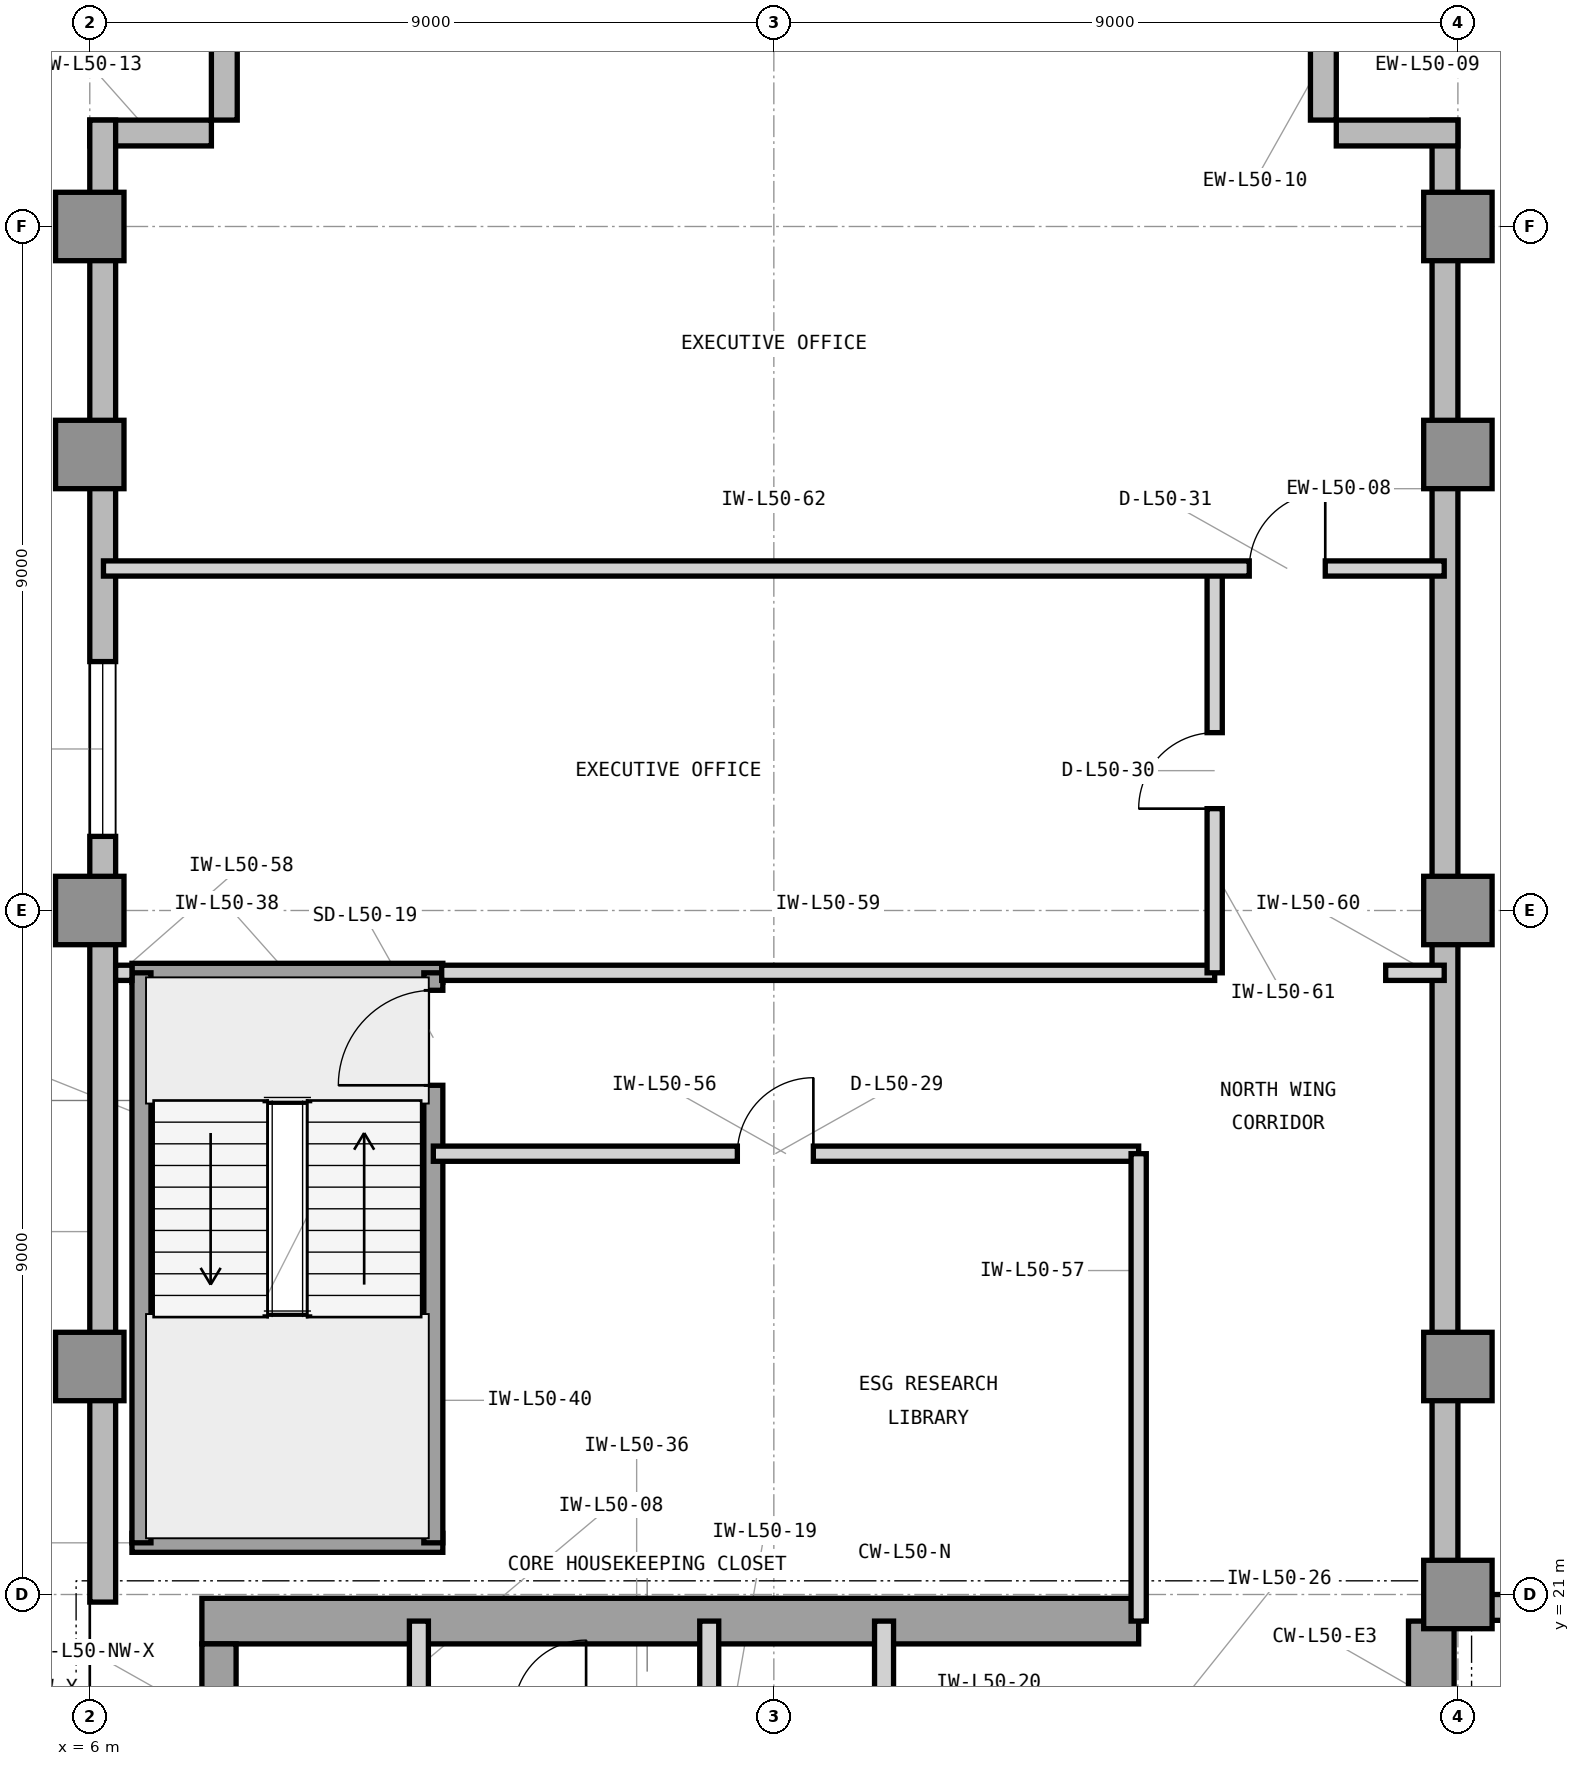
"""IFC4 building model, lengths in metres.
Left out: names, types, materials, properties, quantities, classifications, styles, units other than length and angle.
Written with IfcOpenShell. Run it as: python <this file> out.ifc"""

import sys

from ifc_helpers import new_model, si_unit, direction, frame, frame_2d, origin, origin_2d, place, context, subcontext, project, spatial, rectangle, extrude, element, fill, save


model = new_model("IFC4")
c1 = context("Model", 3, precision=1e-05, world=origin(), true_north=direction((0.0, 1.0)))
c2 = subcontext(c1, "Body", "Model", "MODEL_VIEW")
j1 = project(units=[si_unit("LENGTHUNIT", "METRE"), si_unit("PLANEANGLEUNIT", "RADIAN")], contexts=[c1])
p1 = place(None, origin())
s1 = spatial("IfcSite", under=j1, at=p1, CompositionType="ELEMENT")
p2 = place(p1, origin())
s2 = spatial("IfcBuilding", under=s1, at=p2, CompositionType="ELEMENT")
p3 = place(p2, frame((0.0, 0.0, 207.3)))
s3 = spatial("IfcBuildingStorey", under=s2, at=p3, CompositionType="ELEMENT", Elevation=207.3)
p4 = place(p3, frame((7.475, 20.65, 0.0), z_axis=(0.0, 0.0, 1.0), x_axis=(1.0, 0.0, 0.0)))
e1 = element("IfcWall", 1, at=p4, inside=s3, PredefinedType="SHEAR", context=c2, shape_type="SweptSolid", body=[
    extrude(rectangle(XDim=12.325, YDim=0.6, at=frame_2d((6.163, 0.0))), origin(), (0.0, 0.0, 1.0), 3.9),
])
p5 = place(p3, frame((23.65, 16.6, 0.0), z_axis=(0.0, 0.0, 1.0), x_axis=(0.0, 1.0, 0.0)))
e2 = element("IfcWall", 2, at=p5, inside=s3, PredefinedType="SHEAR", context=c2, shape_type="SweptSolid", body=[
    extrude(rectangle(XDim=4.05, YDim=0.6, at=frame_2d((2.025, 0.0))), origin(), (0.0, 0.0, 1.0), 3.9),
])
p6 = place(p3, frame((7.7, 19.575, 0.0), z_axis=(0.0, 0.0, 1.0), x_axis=(0.0, 1.0, 0.0)))
e3 = element("IfcWall", 3, at=p6, inside=s3, PredefinedType="SHEAR", context=c2, shape_type="SweptSolid", body=[
    extrude(rectangle(XDim=0.775, YDim=0.45, at=frame_2d((0.388, 0.0))), origin(), (0.0, 0.0, 1.0), 3.9),
])
for number, where, z_axis, x_axis in (
    (4, (24.0, 21.0, 0.0), (0.0, 0.0, 1.0), (1.0, 0.0, 0.0)),
    (5, (6.0, 24.0, 0.0), (0.0, 0.0, 1.0), (1.0, 0.0, 0.0)),
    (6, (24.0, 24.0, 0.0), (0.0, 0.0, 1.0), (1.0, 0.0, 0.0)),
    (7, (6.0, 30.0, 0.0), (0.0, 0.0, 1.0), (1.0, 0.0, 0.0)),
    (8, (24.0, 30.0, 0.0), (0.0, 0.0, 1.0), (1.0, 0.0, 0.0)),
    (9, (6.0, 36.0, 0.0), (0.0, 0.0, 1.0), (1.0, 0.0, 0.0)),
    (10, (24.0, 36.0, 0.0), (0.0, 0.0, 1.0), (1.0, 0.0, 0.0)),
    (11, (6.0, 39.0, 0.0), (0.0, 0.0, 1.0), (1.0, 0.0, 0.0)),
    (12, (24.0, 39.0, 0.0), (0.0, 0.0, 1.0), (1.0, 0.0, 0.0)),
):
    element("IfcColumn", number, at=place(p3, frame(where, z_axis=z_axis, x_axis=x_axis)), inside=s3, PredefinedType="COLUMN", context=c2, shape_type="SweptSolid", body=[
        extrude(rectangle(XDim=0.9, YDim=0.9, at=origin_2d()), origin(), (0.0, 0.0, 1.0), 3.9),
    ])
p7 = place(p3, frame((55.4, 20.83, 0.0), z_axis=(0.0, 0.0, 1.0), x_axis=(-1.0, 0.0, 0.0)))
e13 = element("IfcWall", 13, at=p7, inside=s3, PredefinedType="STANDARD", context=c2, shape_type="SweptSolid", body=[
    extrude(rectangle(XDim=31.4, YDim=0.34, at=frame_2d((15.7, 0.0))), origin(), (0.0, 0.0, 1.0), 3.7),
])
p8 = place(p7, frame((17.167, 0.0, 0.9)))
e14 = element("IfcOpeningElement", 14, at=p8, cuts=e13, PredefinedType="OPENING", context=c2, shape_type="SweptSolid", body=[
    extrude(rectangle(XDim=2.3, YDim=2.2, at=frame_2d((1.15, 1.1))), frame((0.0, 0.18, 0.0), z_axis=(0.0, -1.0, 0.0), x_axis=(1.0, 0.0, 0.0)), (0.0, 0.0, 1.0), 0.36),
])
p9 = place(p7, frame((23.825, 0.0, 0.9)))
e15 = element("IfcOpeningElement", 15, at=p9, cuts=e13, PredefinedType="OPENING", context=c2, shape_type="SweptSolid", body=[
    extrude(rectangle(XDim=2.3, YDim=2.2, at=frame_2d((1.15, 1.1))), frame((0.0, 0.18, 0.0), z_axis=(0.0, -1.0, 0.0), x_axis=(1.0, 0.0, 0.0)), (0.0, 0.0, 1.0), 0.36),
])
p10 = place(p7, frame((8.375, 0.0, 0.9)))
e16 = element("IfcOpeningElement", 16, at=p10, cuts=e13, PredefinedType="OPENING", context=c2, shape_type="SweptSolid", body=[
    extrude(rectangle(XDim=2.3, YDim=2.2, at=frame_2d((1.15, 1.1))), frame((0.0, 0.18, 0.0), z_axis=(0.0, -1.0, 0.0), x_axis=(1.0, 0.0, 0.0)), (0.0, 0.0, 1.0), 0.36),
])
p11 = place(p3, frame((23.83, 21.0, 0.0), z_axis=(0.0, 0.0, 1.0), x_axis=(0.0, 1.0, 0.0)))
e17 = element("IfcWall", 17, at=p11, inside=s3, PredefinedType="STANDARD", context=c2, shape_type="SweptSolid", body=[
    extrude(rectangle(XDim=19.4, YDim=0.34, at=frame_2d((9.7, 0.0))), origin(), (0.0, 0.0, 1.0), 3.7),
])
for number, where, z_axis, x_axis in (
    (18, (24.0, 40.23, 0.0), (0.0, 0.0, 1.0), (-1.0, 0.0, 0.0)),
    (19, (22.23, 40.4, 0.0), (0.0, 0.0, 1.0), (0.0, 1.0, 0.0)),
    (20, (7.77, 42.0, 0.0), (0.0, 0.0, 1.0), (0.0, -1.0, 0.0)),
    (21, (7.6, 40.23, 0.0), (0.0, 0.0, 1.0), (-1.0, 0.0, 0.0)),
):
    element("IfcWall", number, at=place(p3, frame(where, z_axis=z_axis, x_axis=x_axis)), inside=s3, PredefinedType="STANDARD", context=c2, shape_type="SweptSolid", body=[
        extrude(rectangle(XDim=1.6, YDim=0.34, at=frame_2d((0.8, 0.0))), origin(), (0.0, 0.0, 1.0), 3.7),
    ])
p12 = place(p3, frame((6.17, 40.4, 0.0), z_axis=(0.0, 0.0, 1.0), x_axis=(0.0, -1.0, 0.0)))
e22 = element("IfcWall", 22, at=p12, inside=s3, PredefinedType="STANDARD", context=c2, shape_type="SweptSolid", body=[
    extrude(rectangle(XDim=19.5, YDim=0.34, at=frame_2d((9.75, 0.0))), origin(), (0.0, 0.0, 1.0), 3.7),
])
p13 = place(p12, frame((7.125, 0.0, 0.9)))
e23 = element("IfcOpeningElement", 23, at=p13, cuts=e22, PredefinedType="OPENING", context=c2, shape_type="SweptSolid", body=[
    extrude(rectangle(XDim=2.3, YDim=2.2, at=frame_2d((1.15, 1.1))), frame((0.0, 0.18, 0.0), z_axis=(0.0, -1.0, 0.0), x_axis=(1.0, 0.0, 0.0)), (0.0, 0.0, 1.0), 0.36),
])
p14 = place(p3, frame((10.33, 19.45, 0.0), z_axis=(0.0, 0.0, 1.0), x_axis=(0.0, 1.0, 0.0)))
e24 = element("IfcWall", 24, at=p14, inside=s3, PredefinedType="PARTITIONING", context=c2, shape_type="SweptSolid", body=[
    extrude(rectangle(XDim=1.2, YDim=0.25, at=frame_2d((0.6, 0.0))), origin(), (0.0, 0.0, 1.0), 3.69),
])
for number, where, z_axis, x_axis in (
    (25, (14.15, 16.7, 0.0), (0.0, 0.0, 1.0), (0.0, 1.0, 0.0)),
    (26, (16.45, 16.7, 0.0), (0.0, 0.0, 1.0), (0.0, 1.0, 0.0)),
):
    element("IfcWall", number, at=place(p3, frame(where, z_axis=z_axis, x_axis=x_axis)), inside=s3, PredefinedType="PARTITIONING", context=c2, shape_type="SweptSolid", body=[
        extrude(rectangle(XDim=3.95, YDim=0.25, at=frame_2d((1.975, 0.0))), origin(), (0.0, 0.0, 1.0), 3.69),
    ])
for number, where, z_axis, x_axis in (
    (27, (6.555, 21.68, 0.0), (0.0, 0.0, 1.0), (1.0, 0.0, 0.0)),
    (28, (6.555, 29.18, 0.0), (0.0, 0.0, 1.0), (1.0, 0.0, 0.0)),
):
    element("IfcWall", number, at=place(p3, frame(where, z_axis=z_axis, x_axis=x_axis)), inside=s3, PredefinedType="SHEAR", context=c2, shape_type="SweptSolid", body=[
        extrude(rectangle(XDim=4.09, YDim=0.25, at=frame_2d((2.045, 0.0))), origin(), (0.0, 0.0, 1.0), 3.9),
    ])
p15 = place(p3, frame((6.68, 21.68, 0.0), z_axis=(0.0, 0.0, 1.0), x_axis=(0.0, 1.0, 0.0)))
e29 = element("IfcWall", 29, at=p15, inside=s3, PredefinedType="SHEAR", context=c2, shape_type="SweptSolid", body=[
    extrude(rectangle(XDim=7.5, YDim=0.25, at=frame_2d((3.75, 0.0))), origin(), (0.0, 0.0, 1.0), 3.9),
])
p16 = place(p3, frame((10.52, 21.68, 0.0), z_axis=(0.0, 0.0, 1.0), x_axis=(0.0, 1.0, 0.0)))
e30 = element("IfcWall", 30, at=p16, inside=s3, PredefinedType="SHEAR", context=c2, shape_type="SweptSolid", body=[
    extrude(rectangle(XDim=7.5, YDim=0.25, at=frame_2d((3.75, 0.0))), origin(), (0.0, 0.0, 1.0), 3.9),
])
p17 = place(p16, frame((6.02, 0.0, 0.0)))
e31 = element("IfcOpeningElement", 31, at=p17, cuts=e30, PredefinedType="OPENING", context=c2, shape_type="SweptSolid", body=[
    extrude(rectangle(XDim=1.25, YDim=2.2, at=frame_2d((0.625, 1.1))), frame((0.0, 0.135, 0.0), z_axis=(0.0, -1.0, 0.0), x_axis=(1.0, 0.0, 0.0)), (0.0, 0.0, 1.0), 0.27),
])
p18 = place(p3, frame((10.52, 26.8, 0.0), z_axis=(0.0, 0.0, 1.0), x_axis=(1.0, 0.0, 0.0)))
e32 = element("IfcWall", 32, at=p18, inside=s3, PredefinedType="PARTITIONING", context=c2, shape_type="SweptSolid", body=[
    extrude(rectangle(XDim=9.28, YDim=0.2, at=frame_2d((4.64, 0.0))), origin(), (0.0, 0.0, 1.0), 3.69),
])
p19 = place(p18, frame((4.0, 0.0, 0.0)))
e33 = element("IfcOpeningElement", 33, at=p19, cuts=e32, PredefinedType="OPENING", context=c2, shape_type="SweptSolid", body=[
    extrude(rectangle(XDim=1.0, YDim=2.15, at=frame_2d((0.5, 1.075))), frame((0.0, 0.11, 0.0), z_axis=(0.0, -1.0, 0.0), x_axis=(1.0, 0.0, 0.0)), (0.0, 0.0, 1.0), 0.22),
])
p20 = place(p3, frame((19.8, 20.65, 0.0), z_axis=(0.0, 0.0, 1.0), x_axis=(0.0, 1.0, 0.0)))
e34 = element("IfcWall", 34, at=p20, inside=s3, PredefinedType="PARTITIONING", context=c2, shape_type="SweptSolid", body=[
    extrude(rectangle(XDim=6.15, YDim=0.2, at=frame_2d((3.075, 0.0))), origin(), (0.0, 0.0, 1.0), 3.69),
])
p21 = place(p3, frame((6.34, 29.18, 0.0), z_axis=(0.0, 0.0, 1.0), x_axis=(1.0, 0.0, 0.0)))
e35 = element("IfcWall", 35, at=p21, inside=s3, PredefinedType="PARTITIONING", context=c2, shape_type="SweptSolid", body=[
    extrude(rectangle(XDim=0.215, YDim=0.2, at=frame_2d((0.107, 0.0))), origin(), (0.0, 0.0, 1.0), 3.69),
])
p22 = place(p3, frame((10.63, 29.18, 0.0), z_axis=(0.0, 0.0, 1.0), x_axis=(1.0, 0.0, 0.0)))
e36 = element("IfcWall", 36, at=p22, inside=s3, PredefinedType="PARTITIONING", context=c2, shape_type="SweptSolid", body=[
    extrude(rectangle(XDim=10.17, YDim=0.2, at=frame_2d((5.085, 0.0))), origin(), (0.0, 0.0, 1.0), 3.69),
])
p23 = place(p3, frame((23.05, 29.18, 0.0), z_axis=(0.0, 0.0, 1.0), x_axis=(1.0, 0.0, 0.0)))
e37 = element("IfcWall", 37, at=p23, inside=s3, PredefinedType="PARTITIONING", context=c2, shape_type="SweptSolid", body=[
    extrude(rectangle(XDim=0.77, YDim=0.2, at=frame_2d((0.385, 0.0))), origin(), (0.0, 0.0, 1.0), 3.69),
])
p24 = place(p3, frame((20.8, 29.18, 0.0), z_axis=(0.0, 0.0, 1.0), x_axis=(0.0, 1.0, 0.0)))
e38 = element("IfcWall", 38, at=p24, inside=s3, PredefinedType="PARTITIONING", context=c2, shape_type="SweptSolid", body=[
    extrude(rectangle(XDim=5.32, YDim=0.2, at=frame_2d((2.66, 0.0))), origin(), (0.0, 0.0, 1.0), 3.69),
])
p25 = place(p24, frame((2.16, 0.0, 0.0)))
e39 = element("IfcOpeningElement", 39, at=p25, cuts=e38, PredefinedType="OPENING", context=c2, shape_type="SweptSolid", body=[
    extrude(rectangle(XDim=1.0, YDim=2.15, at=frame_2d((0.5, 1.075))), frame((0.0, 0.11, 0.0), z_axis=(0.0, -1.0, 0.0), x_axis=(1.0, 0.0, 0.0)), (0.0, 0.0, 1.0), 0.22),
])
p26 = place(p3, frame((6.18, 34.5, 0.0), z_axis=(0.0, 0.0, 1.0), x_axis=(1.0, 0.0, 0.0)))
e40 = element("IfcWall", 40, at=p26, inside=s3, PredefinedType="PARTITIONING", context=c2, shape_type="SweptSolid", body=[
    extrude(rectangle(XDim=17.64, YDim=0.2, at=frame_2d((8.82, 0.0))), origin(), (0.0, 0.0, 1.0), 3.69),
])
p27 = place(p26, frame((15.075, 0.0, 0.0)))
e41 = element("IfcOpeningElement", 41, at=p27, cuts=e40, PredefinedType="OPENING", context=c2, shape_type="SweptSolid", body=[
    extrude(rectangle(XDim=1.0, YDim=2.15, at=frame_2d((0.5, 1.075))), frame((0.0, 0.11, 0.0), z_axis=(0.0, -1.0, 0.0), x_axis=(1.0, 0.0, 0.0)), (0.0, 0.0, 1.0), 0.22),
])
p28 = place(p17, origin())
e42 = element("IfcDoor", 42, at=p28, inside=s3, OperationType="SINGLE_SWING_LEFT", PredefinedType="DOOR", context=c2, shape_type="SweptSolid", body=[
    extrude(rectangle(XDim=1.25, YDim=2.2, at=frame_2d((0.625, 1.1))), frame((0.0, 0.025, 0.0), z_axis=(0.0, -1.0, 0.0), x_axis=(1.0, 0.0, 0.0)), (0.0, 0.0, 1.0), 0.05),
])
fill(e31, e42)
p29 = place(p19, origin())
e43 = element("IfcDoor", 43, at=p29, inside=s3, OperationType="SINGLE_SWING_RIGHT", PredefinedType="DOOR", context=c2, shape_type="SweptSolid", body=[
    extrude(rectangle(XDim=1.0, YDim=2.15, at=frame_2d((0.5, 1.075))), frame((0.0, 0.025, 0.0), z_axis=(0.0, -1.0, 0.0), x_axis=(1.0, 0.0, 0.0)), (0.0, 0.0, 1.0), 0.05),
])
fill(e33, e43)
p30 = place(p25, origin())
e44 = element("IfcDoor", 44, at=p30, inside=s3, OperationType="SINGLE_SWING_LEFT", PredefinedType="DOOR", context=c2, shape_type="SweptSolid", body=[
    extrude(rectangle(XDim=1.0, YDim=2.15, at=frame_2d((0.5, 1.075))), frame((0.0, 0.025, 0.0), z_axis=(0.0, -1.0, 0.0), x_axis=(1.0, 0.0, 0.0)), (0.0, 0.0, 1.0), 0.05),
])
fill(e39, e44)
p31 = place(p27, origin())
e45 = element("IfcDoor", 45, at=p31, inside=s3, OperationType="SINGLE_SWING_RIGHT", PredefinedType="DOOR", context=c2, shape_type="SweptSolid", body=[
    extrude(rectangle(XDim=1.0, YDim=2.15, at=frame_2d((0.5, 1.075))), frame((0.0, 0.025, 0.0), z_axis=(0.0, -1.0, 0.0), x_axis=(1.0, 0.0, 0.0)), (0.0, 0.0, 1.0), 0.05),
])
fill(e41, e45)
p32 = place(p13, origin())
e46 = element("IfcWindow", 46, at=p32, inside=s3, PartitioningType="SINGLE_PANEL", PredefinedType="WINDOW", context=c2, shape_type="SweptSolid", body=[
    extrude(rectangle(XDim=2.3, YDim=2.2, at=frame_2d((1.15, 1.1))), frame((0.0, 0.11, 0.0), z_axis=(0.0, -1.0, 0.0), x_axis=(1.0, 0.0, 0.0)), (0.0, 0.0, 1.0), 0.06),
])
fill(e23, e46)
save(model, sys.argv[1])
